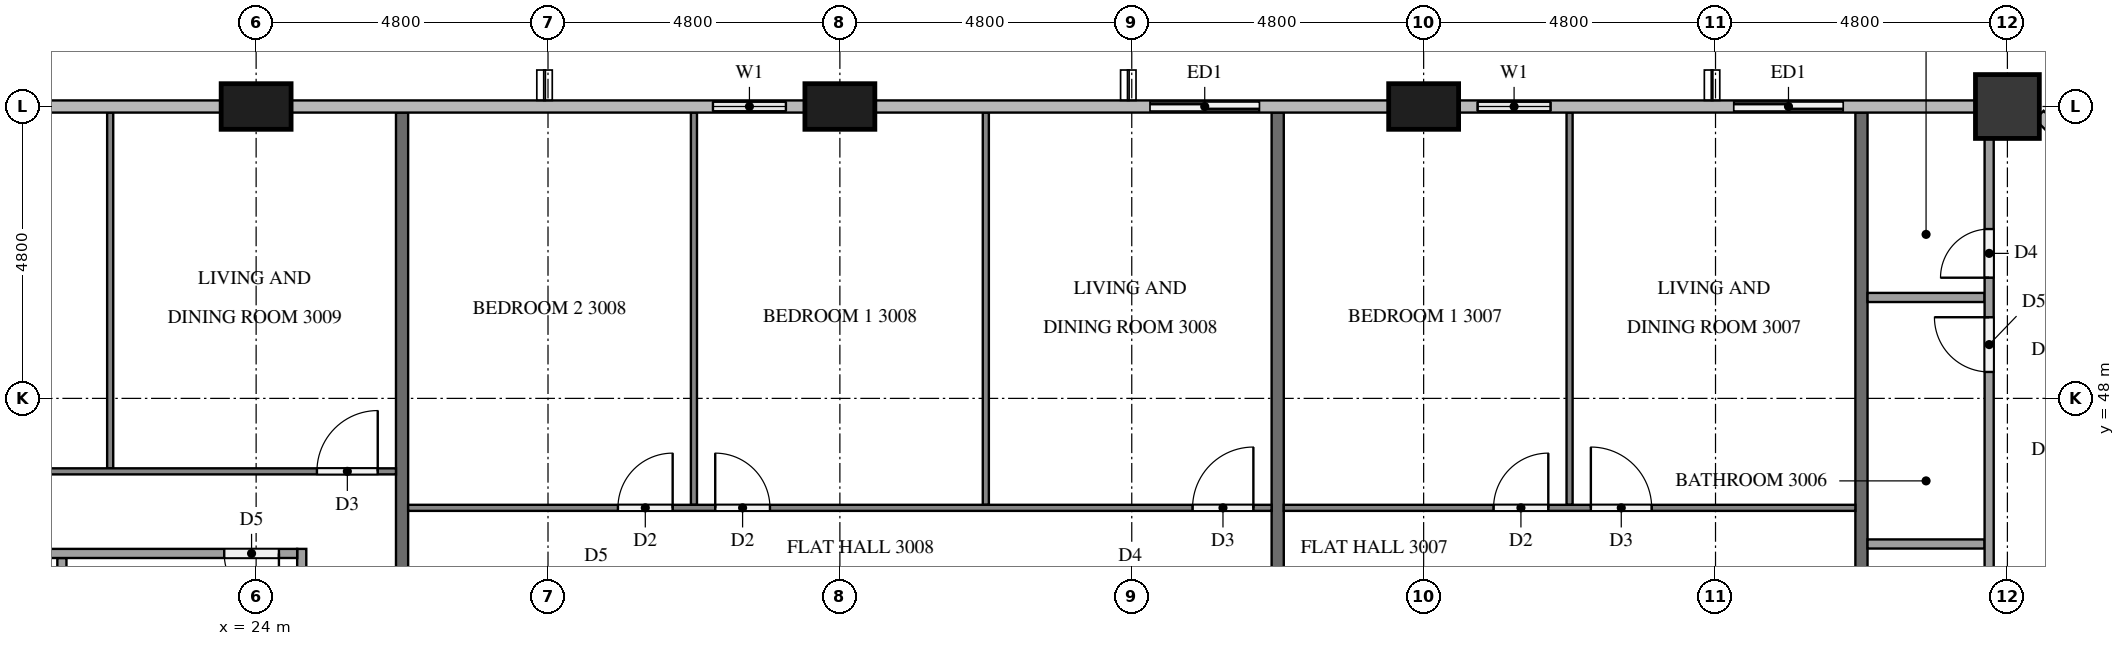
"""IFC4 building model, lengths in metres.
Left out: names, types, materials, properties, quantities, classifications, styles, units other than length and angle.
Written with IfcOpenShell. Run it as: python <this file> out.ifc"""

import sys

from ifc_helpers import new_model, si_unit, direction, frame, frame_2d, origin, origin_2d, place, context, subcontext, project, spatial, rectangle, extrude, element, fill, save


model = new_model("IFC4")
c1 = context("Model", 3, precision=1e-05, world=origin(), true_north=direction((0.0, 1.0)))
c2 = subcontext(c1, "Body", "Model", "MODEL_VIEW")
j1 = project(units=[si_unit("LENGTHUNIT", "METRE"), si_unit("PLANEANGLEUNIT", "RADIAN")], contexts=[c1])
p1 = place(None, origin())
s1 = spatial("IfcSite", under=j1, at=p1, CompositionType="ELEMENT")
p2 = place(p1, origin())
s2 = spatial("IfcBuilding", under=s1, at=p2, CompositionType="ELEMENT")
p3 = place(p2, frame((0.0, 0.0, 119.1)))
s3 = spatial("IfcBuildingStorey", under=s2, at=p3, CompositionType="ELEMENT", Elevation=119.1)
p4 = place(p3, frame((52.8, 52.8, 0.0), z_axis=(0.0, 0.0, 1.0), x_axis=(1.0, 0.0, 0.0)))
e1 = element("IfcColumn", 1, at=p4, inside=s3, PredefinedType="COLUMN", context=c2, shape_type="SweptSolid", body=[
    extrude(rectangle(XDim=1.05, YDim=1.05, at=origin_2d()), origin(), (0.0, 0.0, 1.0), 3.2),
])
for number, where, z_axis, x_axis in (
    (2, (43.2, 52.8, 0.0), (0.0, 0.0, 1.0), (1.0, 0.0, 0.0)),
    (3, (33.6, 52.8, 0.0), (0.0, 0.0, 1.0), (1.0, 0.0, 0.0)),
    (4, (24.0, 52.8, 0.0), (0.0, 0.0, 1.0), (1.0, 0.0, 0.0)),
):
    element("IfcColumn", number, at=place(p3, frame(where, z_axis=z_axis, x_axis=x_axis)), inside=s3, PredefinedType="COLUMN", context=c2, shape_type="SweptSolid", body=[
        extrude(rectangle(XDim=1.15, YDim=0.75, at=origin_2d()), origin(), (0.0, 0.0, 1.0), 3.2),
    ])
p5 = place(p3, frame((50.4, 52.8, 0.0), z_axis=(0.0, 0.0, 1.0), x_axis=(-1.0, 0.0, 0.0)))
e5 = element("IfcWall", 5, at=p5, inside=s3, PredefinedType="SOLIDWALL", context=c2, shape_type="SweptSolid", body=[
    extrude(rectangle(XDim=2.4, YDim=0.15, at=frame_2d((1.2, 0.0))), origin(), (0.0, 0.0, 1.0), 3.2),
])
p6 = place(p5, frame((0.3, 0.0, 0.0)))
e6 = element("IfcOpeningElement", 6, at=p6, cuts=e5, PredefinedType="OPENING", context=c2, shape_type="SweptSolid", body=[
    extrude(rectangle(XDim=1.8, YDim=2.4, at=frame_2d((0.9, 1.2))), frame((0.0, 0.085, 0.0), z_axis=(0.0, -1.0, 0.0), x_axis=(1.0, 0.0, 0.0)), (0.0, 0.0, 1.0), 0.17),
])
p7 = place(p3, frame((45.6, 52.8, 0.0), z_axis=(0.0, 0.0, 1.0), x_axis=(-1.0, 0.0, 0.0)))
e7 = element("IfcWall", 7, at=p7, inside=s3, PredefinedType="SOLIDWALL", context=c2, shape_type="SweptSolid", body=[
    extrude(rectangle(XDim=1.825, YDim=0.15, at=frame_2d((0.913, 0.0))), origin(), (0.0, 0.0, 1.0), 3.2),
])
p8 = place(p7, frame((0.312, 0.0, 0.9)))
e8 = element("IfcOpeningElement", 8, at=p8, cuts=e7, PredefinedType="OPENING", context=c2, shape_type="SweptSolid", body=[
    extrude(rectangle(XDim=1.2, YDim=1.4, at=frame_2d((0.6, 0.7))), frame((0.0, 0.085, 0.0), z_axis=(0.0, -1.0, 0.0), x_axis=(1.0, 0.0, 0.0)), (0.0, 0.0, 1.0), 0.17),
])
p9 = place(p3, frame((40.8, 52.8, 0.0), z_axis=(0.0, 0.0, 1.0), x_axis=(-1.0, 0.0, 0.0)))
e9 = element("IfcWall", 9, at=p9, inside=s3, PredefinedType="SOLIDWALL", context=c2, shape_type="SweptSolid", body=[
    extrude(rectangle(XDim=2.4, YDim=0.15, at=frame_2d((1.2, 0.0))), origin(), (0.0, 0.0, 1.0), 3.2),
])
p10 = place(p9, frame((0.3, 0.0, 0.0)))
e10 = element("IfcOpeningElement", 10, at=p10, cuts=e9, PredefinedType="OPENING", context=c2, shape_type="SweptSolid", body=[
    extrude(rectangle(XDim=1.8, YDim=2.4, at=frame_2d((0.9, 1.2))), frame((0.0, 0.085, 0.0), z_axis=(0.0, -1.0, 0.0), x_axis=(1.0, 0.0, 0.0)), (0.0, 0.0, 1.0), 0.17),
])
p11 = place(p3, frame((33.025, 52.8, 0.0), z_axis=(0.0, 0.0, 1.0), x_axis=(-1.0, 0.0, 0.0)))
e11 = element("IfcWall", 11, at=p11, inside=s3, PredefinedType="SOLIDWALL", context=c2, shape_type="SweptSolid", body=[
    extrude(rectangle(XDim=1.825, YDim=0.15, at=frame_2d((0.913, 0.0))), origin(), (0.0, 0.0, 1.0), 3.2),
])
p12 = place(p11, frame((0.312, 0.0, 0.9)))
e12 = element("IfcOpeningElement", 12, at=p12, cuts=e11, PredefinedType="OPENING", context=c2, shape_type="SweptSolid", body=[
    extrude(rectangle(XDim=1.2, YDim=1.4, at=frame_2d((0.6, 0.7))), frame((0.0, 0.085, 0.0), z_axis=(0.0, -1.0, 0.0), x_axis=(1.0, 0.0, 0.0)), (0.0, 0.0, 1.0), 0.17),
])
for number, where, z_axis, x_axis in (
    (13, (50.4, 40.9, 0.0), (0.0, 0.0, 1.0), (0.0, 1.0, 0.0)),
    (14, (40.8, 52.7, 0.0), (0.0, 0.0, 1.0), (0.0, -1.0, 0.0)),
    (15, (26.4, 52.7, 0.0), (0.0, 0.0, 1.0), (0.0, -1.0, 0.0)),
):
    element("IfcWall", number, at=place(p3, frame(where, z_axis=z_axis, x_axis=x_axis)), inside=s3, PredefinedType="PARTITIONING", context=c2, shape_type="SweptSolid", body=[
        extrude(rectangle(XDim=11.8, YDim=0.2, at=frame_2d((5.9, 0.0))), origin(), (0.0, 0.0, 1.0), 3.2),
    ])
for number, where, z_axis, x_axis in (
    (16, (50.5, 45.606, 0.0), (0.0, 0.0, 1.0), (1.0, 0.0, 0.0)),
    (17, (50.5, 49.66, 0.0), (0.0, 0.0, 1.0), (1.0, 0.0, 0.0)),
):
    element("IfcWall", number, at=place(p3, frame(where, z_axis=z_axis, x_axis=x_axis)), inside=s3, PredefinedType="PARTITIONING", context=c2, shape_type="SweptSolid", body=[
        extrude(rectangle(XDim=1.925, YDim=0.15, at=frame_2d((0.962, 0.0))), origin(), (0.0, 0.0, 1.0), 3.2),
    ])
p13 = place(p3, frame((52.5, 39.525, 0.0), z_axis=(0.0, 0.0, 1.0), x_axis=(0.0, 1.0, 0.0)))
e18 = element("IfcWall", 18, at=p13, inside=s3, PredefinedType="PARTITIONING", context=c2, shape_type="SweptSolid", body=[
    extrude(rectangle(XDim=12.75, YDim=0.15, at=frame_2d((6.375, 0.0))), origin(), (0.0, 0.0, 1.0), 3.2),
])
p14 = place(p13, frame((0.3, 0.0, 0.0)))
e19 = element("IfcOpeningElement", 19, at=p14, cuts=e18, PredefinedType="OPENING", context=c2, shape_type="SweptSolid", body=[
    extrude(rectangle(XDim=0.9, YDim=2.1, at=frame_2d((0.45, 1.05))), frame((0.0, 0.085, 0.0), z_axis=(0.0, -1.0, 0.0), x_axis=(1.0, 0.0, 0.0)), (0.0, 0.0, 1.0), 0.17),
])
p15 = place(p13, frame((8.91, 0.0, 0.0)))
e20 = element("IfcOpeningElement", 20, at=p15, cuts=e18, PredefinedType="OPENING", context=c2, shape_type="SweptSolid", body=[
    extrude(rectangle(XDim=0.9, YDim=2.1, at=frame_2d((0.45, 1.05))), frame((0.0, 0.085, 0.0), z_axis=(0.0, -1.0, 0.0), x_axis=(1.0, 0.0, 0.0)), (0.0, 0.0, 1.0), 0.17),
])
p16 = place(p13, frame((10.46, 0.0, 0.0)))
e21 = element("IfcOpeningElement", 21, at=p16, cuts=e18, PredefinedType="OPENING", context=c2, shape_type="SweptSolid", body=[
    extrude(rectangle(XDim=0.8, YDim=2.1, at=frame_2d((0.4, 1.05))), frame((0.0, 0.085, 0.0), z_axis=(0.0, -1.0, 0.0), x_axis=(1.0, 0.0, 0.0)), (0.0, 0.0, 1.0), 0.17),
])
p17 = place(p3, frame((45.6, 46.25, 0.0), z_axis=(0.0, 0.0, 1.0), x_axis=(0.0, 1.0, 0.0)))
e22 = element("IfcWall", 22, at=p17, inside=s3, PredefinedType="PARTITIONING", context=c2, shape_type="SweptSolid", body=[
    extrude(rectangle(XDim=6.45, YDim=0.1, at=frame_2d((3.225, 0.0))), origin(), (0.0, 0.0, 1.0), 3.2),
])
p18 = place(p3, frame((40.9, 46.2, 0.0), z_axis=(0.0, 0.0, 1.0), x_axis=(1.0, 0.0, 0.0)))
e23 = element("IfcWall", 23, at=p18, inside=s3, PredefinedType="PARTITIONING", context=c2, shape_type="SweptSolid", body=[
    extrude(rectangle(XDim=9.4, YDim=0.1, at=frame_2d((4.7, 0.0))), origin(), (0.0, 0.0, 1.0), 3.2),
])
p19 = place(p18, frame((5.05, 0.0, 0.0)))
e24 = element("IfcOpeningElement", 24, at=p19, cuts=e23, PredefinedType="OPENING", context=c2, shape_type="SweptSolid", body=[
    extrude(rectangle(XDim=1.0, YDim=2.1, at=frame_2d((0.5, 1.05))), frame((0.0, 0.06, 0.0), z_axis=(0.0, -1.0, 0.0), x_axis=(1.0, 0.0, 0.0)), (0.0, 0.0, 1.0), 0.12),
])
p20 = place(p18, frame((3.45, 0.0, 0.0)))
e25 = element("IfcOpeningElement", 25, at=p20, cuts=e23, PredefinedType="OPENING", context=c2, shape_type="SweptSolid", body=[
    extrude(rectangle(XDim=0.9, YDim=2.1, at=frame_2d((0.45, 1.05))), frame((0.0, 0.06, 0.0), z_axis=(0.0, -1.0, 0.0), x_axis=(1.0, 0.0, 0.0)), (0.0, 0.0, 1.0), 0.12),
])
for number, where, z_axis, x_axis in (
    (26, (36.0, 46.25, 0.0), (0.0, 0.0, 1.0), (0.0, 1.0, 0.0)),
    (27, (31.2, 46.25, 0.0), (0.0, 0.0, 1.0), (0.0, 1.0, 0.0)),
):
    element("IfcWall", number, at=place(p3, frame(where, z_axis=z_axis, x_axis=x_axis)), inside=s3, PredefinedType="PARTITIONING", context=c2, shape_type="SweptSolid", body=[
        extrude(rectangle(XDim=6.45, YDim=0.1, at=frame_2d((3.225, 0.0))), origin(), (0.0, 0.0, 1.0), 3.2),
    ])
p21 = place(p3, frame((26.5, 46.2, 0.0), z_axis=(0.0, 0.0, 1.0), x_axis=(1.0, 0.0, 0.0)))
e28 = element("IfcWall", 28, at=p21, inside=s3, PredefinedType="PARTITIONING", context=c2, shape_type="SweptSolid", body=[
    extrude(rectangle(XDim=14.2, YDim=0.1, at=frame_2d((7.1, 0.0))), origin(), (0.0, 0.0, 1.0), 3.2),
])
p22 = place(p21, frame((12.9, 0.0, 0.0)))
e29 = element("IfcOpeningElement", 29, at=p22, cuts=e28, PredefinedType="OPENING", context=c2, shape_type="SweptSolid", body=[
    extrude(rectangle(XDim=1.0, YDim=2.1, at=frame_2d((0.5, 1.05))), frame((0.0, 0.06, 0.0), z_axis=(0.0, -1.0, 0.0), x_axis=(1.0, 0.0, 0.0)), (0.0, 0.0, 1.0), 0.12),
])
p23 = place(p21, frame((5.05, 0.0, 0.0)))
e30 = element("IfcOpeningElement", 30, at=p23, cuts=e28, PredefinedType="OPENING", context=c2, shape_type="SweptSolid", body=[
    extrude(rectangle(XDim=0.9, YDim=2.1, at=frame_2d((0.45, 1.05))), frame((0.0, 0.06, 0.0), z_axis=(0.0, -1.0, 0.0), x_axis=(1.0, 0.0, 0.0)), (0.0, 0.0, 1.0), 0.12),
])
p24 = place(p21, frame((3.45, 0.0, 0.0)))
e31 = element("IfcOpeningElement", 31, at=p24, cuts=e28, PredefinedType="OPENING", context=c2, shape_type="SweptSolid", body=[
    extrude(rectangle(XDim=0.9, YDim=2.1, at=frame_2d((0.45, 1.05))), frame((0.0, 0.06, 0.0), z_axis=(0.0, -1.0, 0.0), x_axis=(1.0, 0.0, 0.0)), (0.0, 0.0, 1.0), 0.12),
])
p25 = place(p3, frame((21.6, 46.85, 0.0), z_axis=(0.0, 0.0, 1.0), x_axis=(0.0, 1.0, 0.0)))
e32 = element("IfcWall", 32, at=p25, inside=s3, PredefinedType="PARTITIONING", context=c2, shape_type="SweptSolid", body=[
    extrude(rectangle(XDim=5.85, YDim=0.1, at=frame_2d((2.925, 0.0))), origin(), (0.0, 0.0, 1.0), 3.2),
])
p26 = place(p3, frame((12.1, 46.8, 0.0), z_axis=(0.0, 0.0, 1.0), x_axis=(1.0, 0.0, 0.0)))
e33 = element("IfcWall", 33, at=p26, inside=s3, PredefinedType="PARTITIONING", context=c2, shape_type="SweptSolid", body=[
    extrude(rectangle(XDim=14.2, YDim=0.1, at=frame_2d((7.1, 0.0))), origin(), (0.0, 0.0, 1.0), 3.2),
])
p27 = place(p26, frame((12.9, 0.0, 0.0)))
e34 = element("IfcOpeningElement", 34, at=p27, cuts=e33, PredefinedType="OPENING", context=c2, shape_type="SweptSolid", body=[
    extrude(rectangle(XDim=1.0, YDim=2.1, at=frame_2d((0.5, 1.05))), frame((0.0, 0.06, 0.0), z_axis=(0.0, -1.0, 0.0), x_axis=(1.0, 0.0, 0.0)), (0.0, 0.0, 1.0), 0.12),
])
p28 = place(p26, frame((5.05, 0.0, 0.0)))
e35 = element("IfcOpeningElement", 35, at=p28, cuts=e33, PredefinedType="OPENING", context=c2, shape_type="SweptSolid", body=[
    extrude(rectangle(XDim=0.9, YDim=2.1, at=frame_2d((0.45, 1.05))), frame((0.0, 0.06, 0.0), z_axis=(0.0, -1.0, 0.0), x_axis=(1.0, 0.0, 0.0)), (0.0, 0.0, 1.0), 0.12),
])
p29 = place(p26, frame((3.45, 0.0, 0.0)))
e36 = element("IfcOpeningElement", 36, at=p29, cuts=e33, PredefinedType="OPENING", context=c2, shape_type="SweptSolid", body=[
    extrude(rectangle(XDim=0.9, YDim=2.1, at=frame_2d((0.45, 1.05))), frame((0.0, 0.06, 0.0), z_axis=(0.0, -1.0, 0.0), x_axis=(1.0, 0.0, 0.0)), (0.0, 0.0, 1.0), 0.12),
])
p30 = place(p3, frame((20.806, 40.9, 0.0), z_axis=(0.0, 0.0, 1.0), x_axis=(0.0, 1.0, 0.0)))
e37 = element("IfcWall", 37, at=p30, inside=s3, PredefinedType="PARTITIONING", context=c2, shape_type="SweptSolid", body=[
    extrude(rectangle(XDim=4.475, YDim=0.15, at=frame_2d((2.238, 0.0))), origin(), (0.0, 0.0, 1.0), 3.2),
])
p31 = place(p3, frame((24.75, 40.9, 0.0), z_axis=(0.0, 0.0, 1.0), x_axis=(0.0, 1.0, 0.0)))
e38 = element("IfcWall", 38, at=p31, inside=s3, PredefinedType="PARTITIONING", context=c2, shape_type="SweptSolid", body=[
    extrude(rectangle(XDim=4.625, YDim=0.15, at=frame_2d((2.312, 0.0))), origin(), (0.0, 0.0, 1.0), 3.2),
])
p32 = place(p3, frame((24.675, 45.45, 0.0), z_axis=(0.0, 0.0, 1.0), x_axis=(-1.0, 0.0, 0.0)))
e39 = element("IfcWall", 39, at=p32, inside=s3, PredefinedType="PARTITIONING", context=c2, shape_type="SweptSolid", body=[
    extrude(rectangle(XDim=12.575, YDim=0.15, at=frame_2d((6.288, 0.0))), origin(), (0.0, 0.0, 1.0), 3.2),
])
p33 = place(p32, frame((0.3, 0.0, 0.0)))
e40 = element("IfcOpeningElement", 40, at=p33, cuts=e39, PredefinedType="OPENING", context=c2, shape_type="SweptSolid", body=[
    extrude(rectangle(XDim=0.9, YDim=2.1, at=frame_2d((0.45, 1.05))), frame((0.0, 0.085, 0.0), z_axis=(0.0, -1.0, 0.0), x_axis=(1.0, 0.0, 0.0)), (0.0, 0.0, 1.0), 0.17),
])
p34 = place(p32, frame((5.646, 0.0, 0.0)))
e41 = element("IfcOpeningElement", 41, at=p34, cuts=e39, PredefinedType="OPENING", context=c2, shape_type="SweptSolid", body=[
    extrude(rectangle(XDim=0.8, YDim=2.1, at=frame_2d((0.4, 1.05))), frame((0.0, 0.085, 0.0), z_axis=(0.0, -1.0, 0.0), x_axis=(1.0, 0.0, 0.0)), (0.0, 0.0, 1.0), 0.17),
])
p35 = place(p32, frame((7.096, 0.0, 0.0)))
e42 = element("IfcOpeningElement", 42, at=p35, cuts=e39, PredefinedType="OPENING", context=c2, shape_type="SweptSolid", body=[
    extrude(rectangle(XDim=0.9, YDim=2.1, at=frame_2d((0.45, 1.05))), frame((0.0, 0.085, 0.0), z_axis=(0.0, -1.0, 0.0), x_axis=(1.0, 0.0, 0.0)), (0.0, 0.0, 1.0), 0.17),
])
p36 = place(p6, origin())
e43 = element("IfcDoor", 43, at=p36, inside=s3, OperationType="SLIDING_TO_LEFT", PredefinedType="DOOR", context=c2, shape_type="SweptSolid", body=[
    extrude(rectangle(XDim=1.8, YDim=2.4, at=frame_2d((0.9, 1.2))), frame((0.0, 0.025, 0.0), z_axis=(0.0, -1.0, 0.0), x_axis=(1.0, 0.0, 0.0)), (0.0, 0.0, 1.0), 0.05),
])
fill(e6, e43)
p37 = place(p8, origin())
e44 = element("IfcWindow", 44, at=p37, inside=s3, PartitioningType="SINGLE_PANEL", PredefinedType="WINDOW", context=c2, shape_type="SweptSolid", body=[
    extrude(rectangle(XDim=1.2, YDim=1.4, at=frame_2d((0.6, 0.7))), frame((0.0, 0.03, 0.0), z_axis=(0.0, -1.0, 0.0), x_axis=(1.0, 0.0, 0.0)), (0.0, 0.0, 1.0), 0.06),
])
fill(e8, e44)
p38 = place(p10, origin())
e45 = element("IfcDoor", 45, at=p38, inside=s3, OperationType="SLIDING_TO_RIGHT", PredefinedType="DOOR", context=c2, shape_type="SweptSolid", body=[
    extrude(rectangle(XDim=1.8, YDim=2.4, at=frame_2d((0.9, 1.2))), frame((0.0, 0.025, 0.0), z_axis=(0.0, -1.0, 0.0), x_axis=(1.0, 0.0, 0.0)), (0.0, 0.0, 1.0), 0.05),
])
fill(e10, e45)
p39 = place(p12, origin())
e46 = element("IfcWindow", 46, at=p39, inside=s3, PartitioningType="SINGLE_PANEL", PredefinedType="WINDOW", context=c2, shape_type="SweptSolid", body=[
    extrude(rectangle(XDim=1.2, YDim=1.4, at=frame_2d((0.6, 0.7))), frame((0.0, 0.03, 0.0), z_axis=(0.0, -1.0, 0.0), x_axis=(1.0, 0.0, 0.0)), (0.0, 0.0, 1.0), 0.06),
])
fill(e12, e46)
p40 = place(p15, origin())
e47 = element("IfcDoor", 47, at=p40, inside=s3, OperationType="SINGLE_SWING_RIGHT", PredefinedType="DOOR", context=c2, shape_type="SweptSolid", body=[
    extrude(rectangle(XDim=0.9, YDim=2.1, at=frame_2d((0.45, 1.05))), frame((0.0, 0.025, 0.0), z_axis=(0.0, -1.0, 0.0), x_axis=(1.0, 0.0, 0.0)), (0.0, 0.0, 1.0), 0.05),
])
fill(e20, e47)
p41 = place(p16, origin())
e48 = element("IfcDoor", 48, at=p41, inside=s3, OperationType="SINGLE_SWING_LEFT", PredefinedType="DOOR", context=c2, shape_type="SweptSolid", body=[
    extrude(rectangle(XDim=0.8, YDim=2.1, at=frame_2d((0.4, 1.05))), frame((0.0, 0.025, 0.0), z_axis=(0.0, -1.0, 0.0), x_axis=(1.0, 0.0, 0.0)), (0.0, 0.0, 1.0), 0.05),
])
fill(e21, e48)
p42 = place(p19, origin())
e49 = element("IfcDoor", 49, at=p42, inside=s3, OperationType="SINGLE_SWING_LEFT", PredefinedType="DOOR", context=c2, shape_type="SweptSolid", body=[
    extrude(rectangle(XDim=1.0, YDim=2.1, at=frame_2d((0.5, 1.05))), frame((0.0, 0.025, 0.0), z_axis=(0.0, -1.0, 0.0), x_axis=(1.0, 0.0, 0.0)), (0.0, 0.0, 1.0), 0.05),
])
fill(e24, e49)
p43 = place(p20, origin())
e50 = element("IfcDoor", 50, at=p43, inside=s3, OperationType="SINGLE_SWING_RIGHT", PredefinedType="DOOR", context=c2, shape_type="SweptSolid", body=[
    extrude(rectangle(XDim=0.9, YDim=2.1, at=frame_2d((0.45, 1.05))), frame((0.0, 0.025, 0.0), z_axis=(0.0, -1.0, 0.0), x_axis=(1.0, 0.0, 0.0)), (0.0, 0.0, 1.0), 0.05),
])
fill(e25, e50)
p44 = place(p22, origin())
e51 = element("IfcDoor", 51, at=p44, inside=s3, OperationType="SINGLE_SWING_RIGHT", PredefinedType="DOOR", context=c2, shape_type="SweptSolid", body=[
    extrude(rectangle(XDim=1.0, YDim=2.1, at=frame_2d((0.5, 1.05))), frame((0.0, 0.025, 0.0), z_axis=(0.0, -1.0, 0.0), x_axis=(1.0, 0.0, 0.0)), (0.0, 0.0, 1.0), 0.05),
])
fill(e29, e51)
p45 = place(p23, origin())
e52 = element("IfcDoor", 52, at=p45, inside=s3, OperationType="SINGLE_SWING_LEFT", PredefinedType="DOOR", context=c2, shape_type="SweptSolid", body=[
    extrude(rectangle(XDim=0.9, YDim=2.1, at=frame_2d((0.45, 1.05))), frame((0.0, 0.025, 0.0), z_axis=(0.0, -1.0, 0.0), x_axis=(1.0, 0.0, 0.0)), (0.0, 0.0, 1.0), 0.05),
])
fill(e30, e52)
p46 = place(p24, origin())
e53 = element("IfcDoor", 53, at=p46, inside=s3, OperationType="SINGLE_SWING_RIGHT", PredefinedType="DOOR", context=c2, shape_type="SweptSolid", body=[
    extrude(rectangle(XDim=0.9, YDim=2.1, at=frame_2d((0.45, 1.05))), frame((0.0, 0.025, 0.0), z_axis=(0.0, -1.0, 0.0), x_axis=(1.0, 0.0, 0.0)), (0.0, 0.0, 1.0), 0.05),
])
fill(e31, e53)
p47 = place(p27, origin())
e54 = element("IfcDoor", 54, at=p47, inside=s3, OperationType="SINGLE_SWING_RIGHT", PredefinedType="DOOR", context=c2, shape_type="SweptSolid", body=[
    extrude(rectangle(XDim=1.0, YDim=2.1, at=frame_2d((0.5, 1.05))), frame((0.0, 0.025, 0.0), z_axis=(0.0, -1.0, 0.0), x_axis=(1.0, 0.0, 0.0)), (0.0, 0.0, 1.0), 0.05),
])
fill(e34, e54)
p48 = place(p33, origin())
e55 = element("IfcDoor", 55, at=p48, inside=s3, OperationType="SINGLE_SWING_LEFT", PredefinedType="DOOR", context=c2, shape_type="SweptSolid", body=[
    extrude(rectangle(XDim=0.9, YDim=2.1, at=frame_2d((0.45, 1.05))), frame((0.0, 0.025, 0.0), z_axis=(0.0, -1.0, 0.0), x_axis=(1.0, 0.0, 0.0)), (0.0, 0.0, 1.0), 0.05),
])
fill(e40, e55)
save(model, sys.argv[1])
